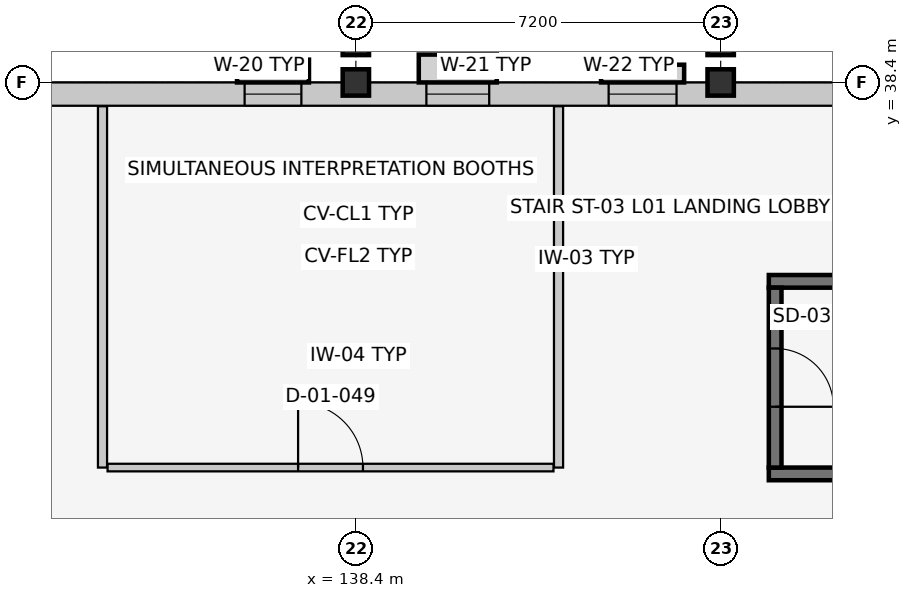
"""IFC4 building model, lengths in metres.
Left out: names, types, materials, properties, quantities, classifications, styles, units other than length and angle.
Written with IfcOpenShell. Run it as: python <this file> out.ifc"""

import sys

from ifc_helpers import new_model, si_unit, direction, frame, frame_2d, origin, origin_2d, place, context, subcontext, project, spatial, rectangle, extrude, element, fill, save


model = new_model("IFC4")
c1 = context("Model", 3, precision=1e-05, world=origin(), true_north=direction((0.0, 1.0)))
c2 = subcontext(c1, "Body", "Model", "MODEL_VIEW")
j1 = project(units=[si_unit("LENGTHUNIT", "METRE"), si_unit("PLANEANGLEUNIT", "RADIAN")], contexts=[c1])
p1 = place(None, origin())
s1 = spatial("IfcSite", under=j1, at=p1, CompositionType="ELEMENT")
p2 = place(p1, origin())
s2 = spatial("IfcBuilding", under=s1, at=p2, CompositionType="ELEMENT")
p3 = place(p2, frame((0.0, 0.0, 5.4)))
s3 = spatial("IfcBuildingStorey", under=s2, at=p3, CompositionType="ELEMENT", Elevation=5.4)
for number, where, z_axis, x_axis in (
    (1, (138.4, 38.4, 0.0), (0.0, 0.0, 1.0), (1.0, 0.0, 0.0)),
    (2, (145.6, 38.4, 0.0), (0.0, 0.0, 1.0), (1.0, 0.0, 0.0)),
    (3, (138.4, 39.2, 0.0), (0.0, 0.0, 1.0), (1.0, 0.0, 0.0)),
    (4, (145.6, 39.2, 0.0), (0.0, 0.0, 1.0), (1.0, 0.0, 0.0)),
):
    element("IfcColumn", number, at=place(p3, frame(where, z_axis=z_axis, x_axis=x_axis)), inside=s3, PredefinedType="COLUMN", context=c2, shape_type="SweptSolid", body=[
        extrude(rectangle(XDim=0.52, YDim=0.52, at=origin_2d()), origin(), (0.0, 0.0, 1.0), 4.2),
    ])
p4 = place(p3, frame((124.0, 38.17, 0.0), z_axis=(0.0, 0.0, 1.0), x_axis=(1.0, 0.0, 0.0)))
e5 = element("IfcWall", 5, at=p4, inside=s3, PredefinedType="SOLIDWALL", context=c2, shape_type="SweptSolid", body=[
    extrude(rectangle(XDim=62.0, YDim=0.46, at=frame_2d((31.0, 0.0))), origin(), (0.0, 0.0, 1.0), 3.095),
])
p5 = place(p4, frame((1.134, 0.0, 0.9)))
e6 = element("IfcOpeningElement", 6, at=p5, cuts=e5, PredefinedType="OPENING", context=c2, shape_type="SweptSolid", body=[
    extrude(rectangle(XDim=1.38, YDim=1.6, at=frame_2d((0.69, 0.8))), frame((0.0, 0.242, 0.0), z_axis=(0.0, -1.0, 0.0), x_axis=(1.0, 0.0, 0.0)), (0.0, 0.0, 1.0), 0.484),
])
p6 = place(p4, frame((4.721, 0.0, 0.9)))
e7 = element("IfcOpeningElement", 7, at=p6, cuts=e5, PredefinedType="OPENING", context=c2, shape_type="SweptSolid", body=[
    extrude(rectangle(XDim=1.5, YDim=1.6, at=frame_2d((0.75, 0.8))), frame((0.0, 0.242, 0.0), z_axis=(0.0, -1.0, 0.0), x_axis=(1.0, 0.0, 0.0)), (0.0, 0.0, 1.0), 0.484),
])
p7 = place(p4, frame((12.205, 0.0, 0.9)))
e8 = element("IfcOpeningElement", 8, at=p7, cuts=e5, PredefinedType="OPENING", context=c2, shape_type="SweptSolid", body=[
    extrude(rectangle(XDim=1.12, YDim=1.75, at=frame_2d((0.56, 0.875))), frame((0.0, 0.242, 0.0), z_axis=(0.0, -1.0, 0.0), x_axis=(1.0, 0.0, 0.0)), (0.0, 0.0, 1.0), 0.484),
])
p8 = place(p4, frame((15.792, 0.0, 0.9)))
e9 = element("IfcOpeningElement", 9, at=p8, cuts=e5, PredefinedType="OPENING", context=c2, shape_type="SweptSolid", body=[
    extrude(rectangle(XDim=1.24, YDim=1.75, at=frame_2d((0.62, 0.875))), frame((0.0, 0.242, 0.0), z_axis=(0.0, -1.0, 0.0), x_axis=(1.0, 0.0, 0.0)), (0.0, 0.0, 1.0), 0.484),
])
p9 = place(p4, frame((19.389, 0.0, 0.9)))
e10 = element("IfcOpeningElement", 10, at=p9, cuts=e5, PredefinedType="OPENING", context=c2, shape_type="SweptSolid", body=[
    extrude(rectangle(XDim=1.34, YDim=1.75, at=frame_2d((0.67, 0.875))), frame((0.0, 0.242, 0.0), z_axis=(0.0, -1.0, 0.0), x_axis=(1.0, 0.0, 0.0)), (0.0, 0.0, 1.0), 0.484),
])
p10 = place(p4, frame((34.147, 0.0, 0.9)))
e11 = element("IfcOpeningElement", 11, at=p10, cuts=e5, PredefinedType="OPENING", context=c2, shape_type="SweptSolid", body=[
    extrude(rectangle(XDim=1.0, YDim=1.35, at=frame_2d((0.5, 0.675))), frame((0.0, 0.242, 0.0), z_axis=(0.0, -1.0, 0.0), x_axis=(1.0, 0.0, 0.0)), (0.0, 0.0, 1.0), 0.484),
])
p11 = place(p4, frame((37.744, 0.0, 0.9)))
e12 = element("IfcOpeningElement", 12, at=p11, cuts=e5, PredefinedType="OPENING", context=c2, shape_type="SweptSolid", body=[
    extrude(rectangle(XDim=1.1, YDim=1.35, at=frame_2d((0.55, 0.675))), frame((0.0, 0.242, 0.0), z_axis=(0.0, -1.0, 0.0), x_axis=(1.0, 0.0, 0.0)), (0.0, 0.0, 1.0), 0.484),
])
p12 = place(p4, frame((48.535, 0.0, 0.9)))
e13 = element("IfcOpeningElement", 13, at=p12, cuts=e5, PredefinedType="OPENING", context=c2, shape_type="SweptSolid", body=[
    extrude(rectangle(XDim=1.4, YDim=1.35, at=frame_2d((0.7, 0.675))), frame((0.0, 0.242, 0.0), z_axis=(0.0, -1.0, 0.0), x_axis=(1.0, 0.0, 0.0)), (0.0, 0.0, 1.0), 0.484),
])
p13 = place(p4, frame((59.602, 0.0, 0.9)))
e14 = element("IfcOpeningElement", 14, at=p13, cuts=e5, PredefinedType="OPENING", context=c2, shape_type="SweptSolid", body=[
    extrude(rectangle(XDim=1.15, YDim=1.45, at=frame_2d((0.575, 0.725))), frame((0.0, 0.242, 0.0), z_axis=(0.0, -1.0, 0.0), x_axis=(1.0, 0.0, 0.0)), (0.0, 0.0, 1.0), 0.484),
])
for number, where, z_axis, x_axis in (
    (15, (146.55, 30.675, 0.0), (0.0, 0.0, 1.0), (1.0, 0.0, 0.0)),
    (16, (155.45, 34.475, 0.0), (0.0, 0.0, 1.0), (-1.0, 0.0, 0.0)),
):
    element("IfcWall", number, at=place(p3, frame(where, z_axis=z_axis, x_axis=x_axis)), inside=s3, PredefinedType="SHEAR", context=c2, shape_type="SweptSolid", body=[
        extrude(rectangle(XDim=8.9, YDim=0.25, at=frame_2d((4.45, 0.0))), origin(), (0.0, 0.0, 1.0), 3.94),
    ])
p14 = place(p3, frame((146.675, 34.35, 0.0), z_axis=(0.0, 0.0, 1.0), x_axis=(0.0, -1.0, 0.0)))
e17 = element("IfcWall", 17, at=p14, inside=s3, PredefinedType="SHEAR", context=c2, shape_type="SweptSolid", body=[
    extrude(rectangle(XDim=3.55, YDim=0.25, at=frame_2d((1.775, 0.0))), origin(), (0.0, 0.0, 1.0), 3.94),
])
p15 = place(p14, frame((1.2, 0.0, 0.0)))
e18 = element("IfcOpeningElement", 18, at=p15, cuts=e17, PredefinedType="OPENING", context=c2, shape_type="SweptSolid", body=[
    extrude(rectangle(XDim=1.15, YDim=2.15, at=frame_2d((0.575, 1.075))), frame((0.0, 0.137, 0.0), z_axis=(0.0, -1.0, 0.0), x_axis=(1.0, 0.0, 0.0)), (0.0, 0.0, 1.0), 0.274),
])
for number, where, z_axis, x_axis in (
    (19, (142.4, 30.8, 0.0), (0.0, 0.0, 1.0), (0.0, 1.0, 0.0)),
    (20, (133.4, 30.8, 0.0), (0.0, 0.0, 1.0), (0.0, 1.0, 0.0)),
):
    element("IfcWall", number, at=place(p3, frame(where, z_axis=z_axis, x_axis=x_axis)), inside=s3, PredefinedType="PARTITIONING", context=c2, shape_type="SweptSolid", body=[
        extrude(rectangle(XDim=7.13, YDim=0.18, at=frame_2d((3.565, 0.0))), origin(), (0.0, 0.0, 1.0), 3.94),
    ])
p16 = place(p3, frame((133.5, 30.8, 0.0), z_axis=(0.0, 0.0, 1.0), x_axis=(1.0, 0.0, 0.0)))
e21 = element("IfcWall", 21, at=p16, inside=s3, PredefinedType="PARTITIONING", context=c2, shape_type="SweptSolid", body=[
    extrude(rectangle(XDim=8.8, YDim=0.15, at=frame_2d((4.4, 0.0))), origin(), (0.0, 0.0, 1.0), 3.94),
])
p17 = place(p16, frame((3.76, 0.0, 0.0)))
e22 = element("IfcOpeningElement", 22, at=p17, cuts=e21, PredefinedType="OPENING", context=c2, shape_type="SweptSolid", body=[
    extrude(rectangle(XDim=1.28, YDim=2.2, at=frame_2d((0.64, 1.1))), frame((0.0, 0.087, 0.0), z_axis=(0.0, -1.0, 0.0), x_axis=(1.0, 0.0, 0.0)), (0.0, 0.0, 1.0), 0.174),
])
p18 = place(p7, origin())
e23 = element("IfcWindow", 23, at=p18, inside=s3, PartitioningType="SINGLE_PANEL", PredefinedType="WINDOW", context=c2, shape_type="SweptSolid", body=[
    extrude(rectangle(XDim=1.12, YDim=1.75, at=frame_2d((0.56, 0.875))), frame((0.0, 0.03, 0.0), z_axis=(0.0, -1.0, 0.0), x_axis=(1.0, 0.0, 0.0)), (0.0, 0.0, 1.0), 0.06),
])
fill(e8, e23)
p19 = place(p8, origin())
e24 = element("IfcWindow", 24, at=p19, inside=s3, PartitioningType="SINGLE_PANEL", PredefinedType="WINDOW", context=c2, shape_type="SweptSolid", body=[
    extrude(rectangle(XDim=1.24, YDim=1.75, at=frame_2d((0.62, 0.875))), frame((0.0, 0.03, 0.0), z_axis=(0.0, -1.0, 0.0), x_axis=(1.0, 0.0, 0.0)), (0.0, 0.0, 1.0), 0.06),
])
fill(e9, e24)
p20 = place(p9, origin())
e25 = element("IfcWindow", 25, at=p20, inside=s3, PartitioningType="SINGLE_PANEL", PredefinedType="WINDOW", context=c2, shape_type="SweptSolid", body=[
    extrude(rectangle(XDim=1.34, YDim=1.75, at=frame_2d((0.67, 0.875))), frame((0.0, 0.03, 0.0), z_axis=(0.0, -1.0, 0.0), x_axis=(1.0, 0.0, 0.0)), (0.0, 0.0, 1.0), 0.06),
])
fill(e10, e25)
p21 = place(p15, origin())
e26 = element("IfcDoor", 26, at=p21, inside=s3, OperationType="SINGLE_SWING_RIGHT", PredefinedType="DOOR", context=c2, shape_type="SweptSolid", body=[
    extrude(rectangle(XDim=1.15, YDim=2.15, at=frame_2d((0.575, 1.075))), frame((0.0, 0.025, 0.0), z_axis=(0.0, -1.0, 0.0), x_axis=(1.0, 0.0, 0.0)), (0.0, 0.0, 1.0), 0.05),
])
fill(e18, e26)
p22 = place(p17, origin())
e27 = element("IfcDoor", 27, at=p22, inside=s3, OperationType="SINGLE_SWING_LEFT", PredefinedType="DOOR", context=c2, shape_type="SweptSolid", body=[
    extrude(rectangle(XDim=1.28, YDim=2.2, at=frame_2d((0.64, 1.1))), frame((0.0, 0.025, 0.0), z_axis=(0.0, -1.0, 0.0), x_axis=(1.0, 0.0, 0.0)), (0.0, 0.0, 1.0), 0.05),
])
fill(e22, e27)
save(model, sys.argv[1])
